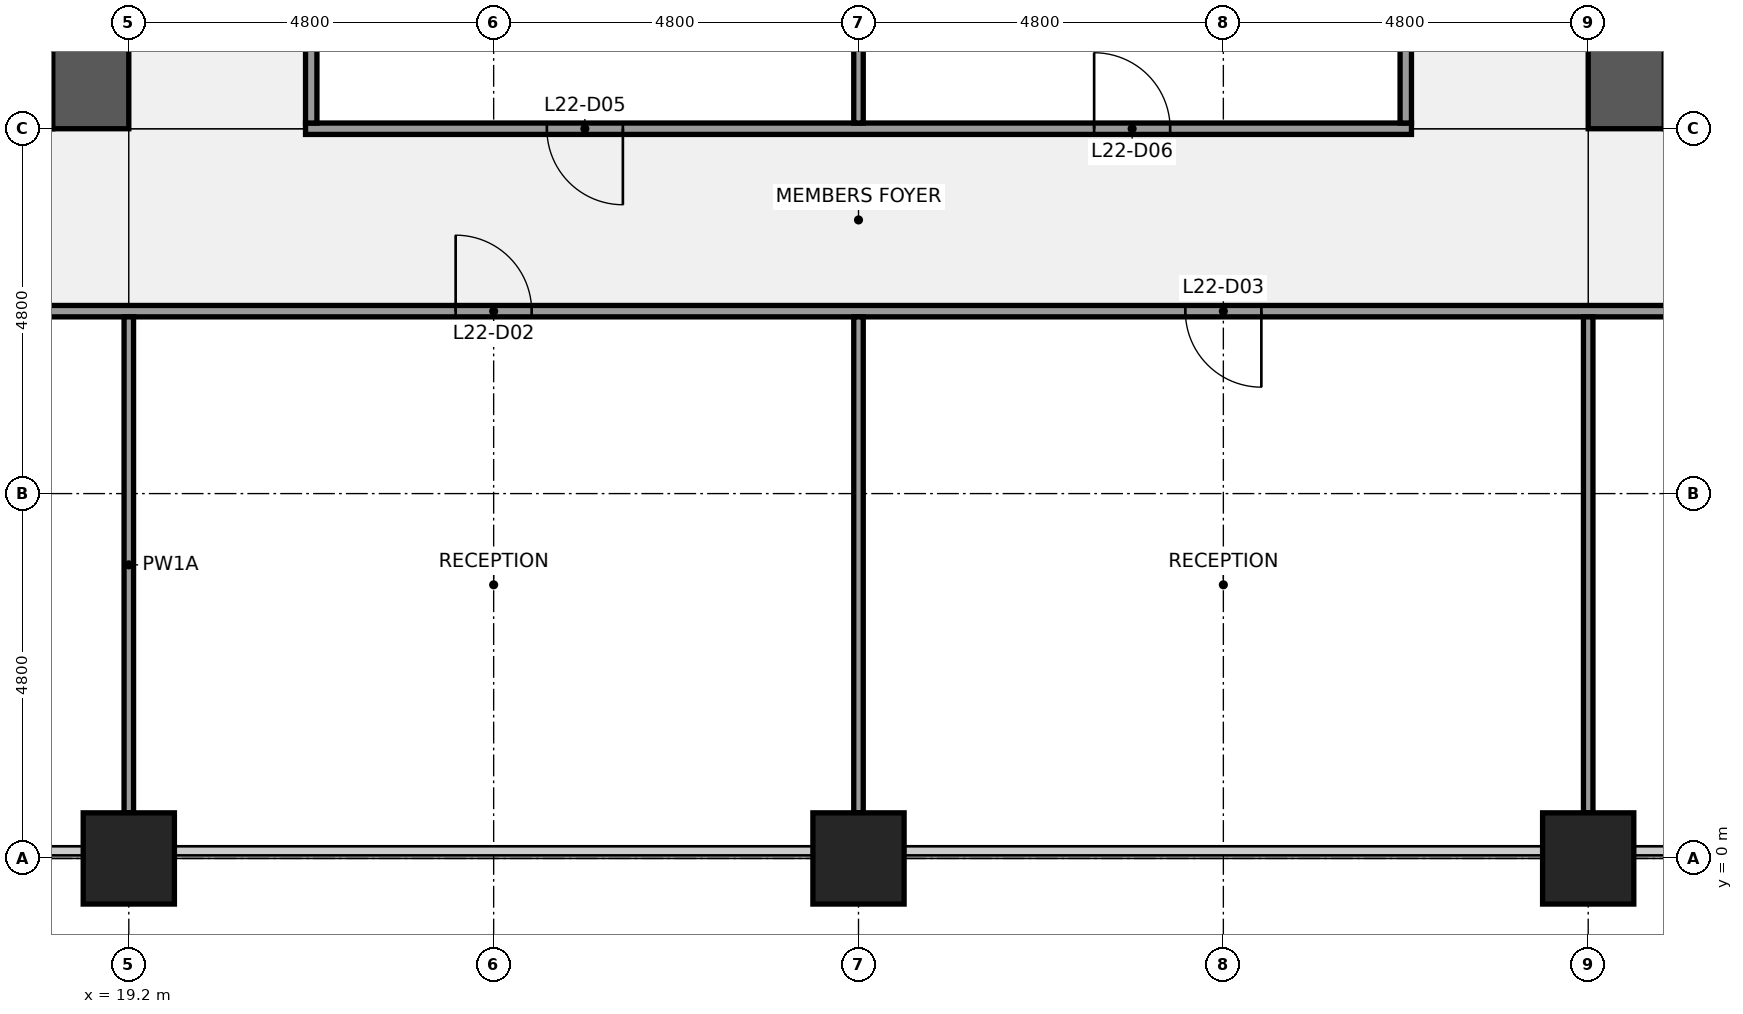
"""IFC4 building model, lengths in metres.
Left out: names, types, materials, properties, quantities, classifications, styles, units other than length and angle.
Written with IfcOpenShell. Run it as: python <this file> out.ifc"""

import sys

from ifc_helpers import new_model, si_unit, direction, frame, frame_2d, origin, origin_2d, place, context, subcontext, project, spatial, rectangle, extrude, element, fill, save


model = new_model("IFC4")
c1 = context("Model", 3, precision=1e-05, world=origin(), true_north=direction((0.0, 1.0)))
c2 = subcontext(c1, "Body", "Model", "MODEL_VIEW")
j1 = project(units=[si_unit("LENGTHUNIT", "METRE"), si_unit("PLANEANGLEUNIT", "RADIAN")], contexts=[c1])
p1 = place(None, origin())
s1 = spatial("IfcSite", under=j1, at=p1, CompositionType="ELEMENT")
p2 = place(p1, origin())
s2 = spatial("IfcBuilding", under=s1, at=p2, CompositionType="ELEMENT")
p3 = place(p2, frame((0.0, 0.0, 108.1)))
s3 = spatial("IfcBuildingStorey", under=s2, at=p3, CompositionType="ELEMENT", Elevation=108.1)
for number, where, z_axis, x_axis in (
    (1, (19.2, 0.0, 0.0), (0.0, 0.0, 1.0), (1.0, 0.0, 0.0)),
    (2, (28.8, 0.0, 0.0), (0.0, 0.0, 1.0), (1.0, 0.0, 0.0)),
    (3, (38.4, 0.0, 0.0), (0.0, 0.0, 1.0), (1.0, 0.0, 0.0)),
):
    element("IfcColumn", number, at=place(p3, frame(where, z_axis=z_axis, x_axis=x_axis)), inside=s3, PredefinedType="COLUMN", context=c2, shape_type="SweptSolid", body=[
        extrude(rectangle(XDim=1.2, YDim=1.2, at=origin_2d()), origin(), (0.0, 0.0, 1.0), 4.0),
    ])
p4 = place(p3, frame((18.2, 10.1, 0.0), z_axis=(0.0, 0.0, 1.0), x_axis=(-1.0, 0.0, 0.0)))
e4 = element("IfcWall", 4, at=p4, inside=s3, PredefinedType="SHEAR", context=c2, shape_type="SweptSolid", body=[
    extrude(rectangle(XDim=8.6, YDim=1.0, at=frame_2d((4.3, 0.0))), origin(), (0.0, 0.0, 1.0), 3.84),
])
p5 = place(p4, frame((0.85, 0.0, 0.0)))
e5 = element("IfcOpeningElement", 5, at=p5, cuts=e4, PredefinedType="OPENING", context=c2, shape_type="SweptSolid", body=[
    extrude(rectangle(XDim=1.1, YDim=2.1, at=frame_2d((0.55, 1.05))), frame((0.0, 0.51, 0.0), z_axis=(0.0, -1.0, 0.0), x_axis=(1.0, 0.0, 0.0)), (0.0, 0.0, 1.0), 1.02),
])
p6 = place(p3, frame((18.7, 38.4, 0.0), z_axis=(0.0, 0.0, 1.0), x_axis=(0.0, -1.0, 0.0)))
e6 = element("IfcWall", 6, at=p6, inside=s3, PredefinedType="SHEAR", context=c2, shape_type="SweptSolid", body=[
    extrude(rectangle(XDim=28.8, YDim=1.0, at=frame_2d((14.4, 0.0))), origin(), (0.0, 0.0, 1.0), 3.84),
])
p7 = place(p6, frame((18.3, 0.0, 0.0)))
e7 = element("IfcOpeningElement", 7, at=p7, cuts=e6, PredefinedType="OPENING", context=c2, shape_type="SweptSolid", body=[
    extrude(rectangle(XDim=1.8, YDim=2.1, at=frame_2d((0.9, 1.05))), frame((0.0, 0.51, 0.0), z_axis=(0.0, -1.0, 0.0), x_axis=(1.0, 0.0, 0.0)), (0.0, 0.0, 1.0), 1.02),
])
p8 = place(p6, frame((8.7, 0.0, 0.0)))
e8 = element("IfcOpeningElement", 8, at=p8, cuts=e6, PredefinedType="OPENING", context=c2, shape_type="SweptSolid", body=[
    extrude(rectangle(XDim=1.8, YDim=2.1, at=frame_2d((0.9, 1.05))), frame((0.0, 0.51, 0.0), z_axis=(0.0, -1.0, 0.0), x_axis=(1.0, 0.0, 0.0)), (0.0, 0.0, 1.0), 1.02),
])
p9 = place(p3, frame((52.8, 10.1, 0.0), z_axis=(0.0, 0.0, 1.0), x_axis=(-1.0, 0.0, 0.0)))
e9 = element("IfcWall", 9, at=p9, inside=s3, PredefinedType="SHEAR", context=c2, shape_type="SweptSolid", body=[
    extrude(rectangle(XDim=13.4, YDim=1.0, at=frame_2d((6.7, 0.0))), origin(), (0.0, 0.0, 1.0), 3.84),
])
p10 = place(p9, frame((11.45, 0.0, 0.0)))
e10 = element("IfcOpeningElement", 10, at=p10, cuts=e9, PredefinedType="OPENING", context=c2, shape_type="SweptSolid", body=[
    extrude(rectangle(XDim=1.1, YDim=2.1, at=frame_2d((0.55, 1.05))), frame((0.0, 0.51, 0.0), z_axis=(0.0, -1.0, 0.0), x_axis=(1.0, 0.0, 0.0)), (0.0, 0.0, 1.0), 1.02),
])
p11 = place(p3, frame((38.9, 9.6, 0.0), z_axis=(0.0, 0.0, 1.0), x_axis=(0.0, 1.0, 0.0)))
e11 = element("IfcWall", 11, at=p11, inside=s3, PredefinedType="SHEAR", context=c2, shape_type="SweptSolid", body=[
    extrude(rectangle(XDim=28.8, YDim=1.0, at=frame_2d((14.4, 0.0))), origin(), (0.0, 0.0, 1.0), 3.84),
])
p12 = place(p11, frame((8.7, 0.0, 0.0)))
e12 = element("IfcOpeningElement", 12, at=p12, cuts=e11, PredefinedType="OPENING", context=c2, shape_type="SweptSolid", body=[
    extrude(rectangle(XDim=1.8, YDim=2.1, at=frame_2d((0.9, 1.05))), frame((0.0, 0.51, 0.0), z_axis=(0.0, -1.0, 0.0), x_axis=(1.0, 0.0, 0.0)), (0.0, 0.0, 1.0), 1.02),
])
p13 = place(p11, frame((18.3, 0.0, 0.0)))
e13 = element("IfcOpeningElement", 13, at=p13, cuts=e11, PredefinedType="OPENING", context=c2, shape_type="SweptSolid", body=[
    extrude(rectangle(XDim=1.8, YDim=2.1, at=frame_2d((0.9, 1.05))), frame((0.0, 0.51, 0.0), z_axis=(0.0, -1.0, 0.0), x_axis=(1.0, 0.0, 0.0)), (0.0, 0.0, 1.0), 1.02),
])
p14 = place(p3, frame((9.7, 7.2, 0.0), z_axis=(0.0, 0.0, 1.0), x_axis=(1.0, 0.0, 0.0)))
e14 = element("IfcWall", 14, at=p14, inside=s3, PredefinedType="PARTITIONING", context=c2, shape_type="SweptSolid", body=[
    extrude(rectangle(XDim=38.375, YDim=0.15, at=frame_2d((19.188, 0.0))), origin(), (0.0, 0.0, 1.0), 2.936),
])
p15 = place(p14, frame((4.25, 0.0, 0.0)))
e15 = element("IfcOpeningElement", 15, at=p15, cuts=e14, PredefinedType="OPENING", context=c2, shape_type="SweptSolid", body=[
    extrude(rectangle(XDim=1.0, YDim=2.1, at=frame_2d((0.5, 1.05))), frame((0.0, 0.085, 0.0), z_axis=(0.0, -1.0, 0.0), x_axis=(1.0, 0.0, 0.0)), (0.0, 0.0, 1.0), 0.17),
])
p16 = place(p14, frame((13.8, 0.0, 0.0)))
e16 = element("IfcOpeningElement", 16, at=p16, cuts=e14, PredefinedType="OPENING", context=c2, shape_type="SweptSolid", body=[
    extrude(rectangle(XDim=1.0, YDim=2.1, at=frame_2d((0.5, 1.05))), frame((0.0, 0.085, 0.0), z_axis=(0.0, -1.0, 0.0), x_axis=(1.0, 0.0, 0.0)), (0.0, 0.0, 1.0), 0.17),
])
p17 = place(p14, frame((23.4, 0.0, 0.0)))
e17 = element("IfcOpeningElement", 17, at=p17, cuts=e14, PredefinedType="OPENING", context=c2, shape_type="SweptSolid", body=[
    extrude(rectangle(XDim=1.0, YDim=2.1, at=frame_2d((0.5, 1.05))), frame((0.0, 0.085, 0.0), z_axis=(0.0, -1.0, 0.0), x_axis=(1.0, 0.0, 0.0)), (0.0, 0.0, 1.0), 0.17),
])
p18 = place(p14, frame((33.0, 0.0, 0.0)))
e18 = element("IfcOpeningElement", 18, at=p18, cuts=e14, PredefinedType="OPENING", context=c2, shape_type="SweptSolid", body=[
    extrude(rectangle(XDim=1.0, YDim=2.1, at=frame_2d((0.5, 1.05))), frame((0.0, 0.085, 0.0), z_axis=(0.0, -1.0, 0.0), x_axis=(1.0, 0.0, 0.0)), (0.0, 0.0, 1.0), 0.17),
])
p19 = place(p3, frame((21.525, 9.6, 0.0), z_axis=(0.0, 0.0, 1.0), x_axis=(1.0, 0.0, 0.0)))
e19 = element("IfcWall", 19, at=p19, inside=s3, PredefinedType="PARTITIONING", context=c2, shape_type="SweptSolid", body=[
    extrude(rectangle(XDim=14.55, YDim=0.15, at=frame_2d((7.275, 0.0))), origin(), (0.0, 0.0, 1.0), 2.936),
])
p20 = place(p19, frame((3.175, 0.0, 0.0)))
e20 = element("IfcOpeningElement", 20, at=p20, cuts=e19, PredefinedType="OPENING", context=c2, shape_type="SweptSolid", body=[
    extrude(rectangle(XDim=1.0, YDim=2.1, at=frame_2d((0.5, 1.05))), frame((0.0, 0.085, 0.0), z_axis=(0.0, -1.0, 0.0), x_axis=(1.0, 0.0, 0.0)), (0.0, 0.0, 1.0), 0.17),
])
p21 = place(p19, frame((10.375, 0.0, 0.0)))
e21 = element("IfcOpeningElement", 21, at=p21, cuts=e19, PredefinedType="OPENING", context=c2, shape_type="SweptSolid", body=[
    extrude(rectangle(XDim=1.0, YDim=2.1, at=frame_2d((0.5, 1.05))), frame((0.0, 0.085, 0.0), z_axis=(0.0, -1.0, 0.0), x_axis=(1.0, 0.0, 0.0)), (0.0, 0.0, 1.0), 0.17),
])
p22 = place(p3, frame((19.2, 0.6, 0.0), z_axis=(0.0, 0.0, 1.0), x_axis=(0.0, 1.0, 0.0)))
e22 = element("IfcWall", 22, at=p22, inside=s3, PredefinedType="PARTITIONING", context=c2, shape_type="SweptSolid", body=[
    extrude(rectangle(XDim=6.525, YDim=0.125, at=frame_2d((3.262, 0.0))), origin(), (0.0, 0.0, 1.0), 2.936),
])
p23 = place(p3, frame((21.6, 9.675, 0.0), z_axis=(0.0, 0.0, 1.0), x_axis=(0.0, 1.0, 0.0)))
e23 = element("IfcWall", 23, at=p23, inside=s3, PredefinedType="PARTITIONING", context=c2, shape_type="SweptSolid", body=[
    extrude(rectangle(XDim=4.65, YDim=0.15, at=frame_2d((2.325, 0.0))), origin(), (0.0, 0.0, 1.0), 2.936),
])
p24 = place(p3, frame((28.8, 0.6, 0.0), z_axis=(0.0, 0.0, 1.0), x_axis=(0.0, 1.0, 0.0)))
e24 = element("IfcWall", 24, at=p24, inside=s3, PredefinedType="PARTITIONING", context=c2, shape_type="SweptSolid", body=[
    extrude(rectangle(XDim=6.525, YDim=0.125, at=frame_2d((3.262, 0.0))), origin(), (0.0, 0.0, 1.0), 2.936),
])
p25 = place(p3, frame((28.8, 9.675, 0.0), z_axis=(0.0, 0.0, 1.0), x_axis=(0.0, 1.0, 0.0)))
e25 = element("IfcWall", 25, at=p25, inside=s3, PredefinedType="PARTITIONING", context=c2, shape_type="SweptSolid", body=[
    extrude(rectangle(XDim=4.662, YDim=0.125, at=frame_2d((2.331, 0.0))), origin(), (0.0, 0.0, 1.0), 2.936),
])
p26 = place(p3, frame((36.0, 9.675, 0.0), z_axis=(0.0, 0.0, 1.0), x_axis=(0.0, 1.0, 0.0)))
e26 = element("IfcWall", 26, at=p26, inside=s3, PredefinedType="PARTITIONING", context=c2, shape_type="SweptSolid", body=[
    extrude(rectangle(XDim=4.65, YDim=0.15, at=frame_2d((2.325, 0.0))), origin(), (0.0, 0.0, 1.0), 2.936),
])
p27 = place(p3, frame((38.4, 0.6, 0.0), z_axis=(0.0, 0.0, 1.0), x_axis=(0.0, 1.0, 0.0)))
e27 = element("IfcWall", 27, at=p27, inside=s3, PredefinedType="PARTITIONING", context=c2, shape_type="SweptSolid", body=[
    extrude(rectangle(XDim=6.525, YDim=0.125, at=frame_2d((3.262, 0.0))), origin(), (0.0, 0.0, 1.0), 2.936),
])
for number, where, z_axis, x_axis in (
    (28, (19.2, -1.05, 0.0), (0.0, 0.0, 1.0), (1.0, 0.0, 0.0)),
    (29, (38.4, -1.05, 0.0), (0.0, 0.0, 1.0), (1.0, 0.0, 0.0)),
):
    element("IfcColumn", number, at=place(p3, frame(where, z_axis=z_axis, x_axis=x_axis)), inside=s3, PredefinedType="PILASTER", context=c2, shape_type="SweptSolid", body=[
        extrude(rectangle(XDim=3.6, YDim=0.9, at=origin_2d()), origin(), (0.0, 0.0, 1.0), 4.0),
    ])
p28 = place(p16, origin())
e30 = element("IfcDoor", 30, at=p28, inside=s3, OperationType="SINGLE_SWING_LEFT", PredefinedType="DOOR", context=c2, shape_type="SweptSolid", body=[
    extrude(rectangle(XDim=1.0, YDim=2.1, at=frame_2d((0.5, 1.05))), frame((0.0, 0.025, 0.0), z_axis=(0.0, -1.0, 0.0), x_axis=(1.0, 0.0, 0.0)), (0.0, 0.0, 1.0), 0.05),
])
fill(e16, e30)
p29 = place(p17, origin())
e31 = element("IfcDoor", 31, at=p29, inside=s3, OperationType="SINGLE_SWING_RIGHT", PredefinedType="DOOR", context=c2, shape_type="SweptSolid", body=[
    extrude(rectangle(XDim=1.0, YDim=2.1, at=frame_2d((0.5, 1.05))), frame((0.0, 0.025, 0.0), z_axis=(0.0, -1.0, 0.0), x_axis=(1.0, 0.0, 0.0)), (0.0, 0.0, 1.0), 0.05),
])
fill(e17, e31)
p30 = place(p20, origin())
e32 = element("IfcDoor", 32, at=p30, inside=s3, OperationType="SINGLE_SWING_RIGHT", PredefinedType="DOOR", context=c2, shape_type="SweptSolid", body=[
    extrude(rectangle(XDim=1.0, YDim=2.1, at=frame_2d((0.5, 1.05))), frame((0.0, 0.025, 0.0), z_axis=(0.0, -1.0, 0.0), x_axis=(1.0, 0.0, 0.0)), (0.0, 0.0, 1.0), 0.05),
])
fill(e20, e32)
p31 = place(p21, origin())
e33 = element("IfcDoor", 33, at=p31, inside=s3, OperationType="SINGLE_SWING_LEFT", PredefinedType="DOOR", context=c2, shape_type="SweptSolid", body=[
    extrude(rectangle(XDim=1.0, YDim=2.1, at=frame_2d((0.5, 1.05))), frame((0.0, 0.025, 0.0), z_axis=(0.0, -1.0, 0.0), x_axis=(1.0, 0.0, 0.0)), (0.0, 0.0, 1.0), 0.05),
])
fill(e21, e33)
save(model, sys.argv[1])
